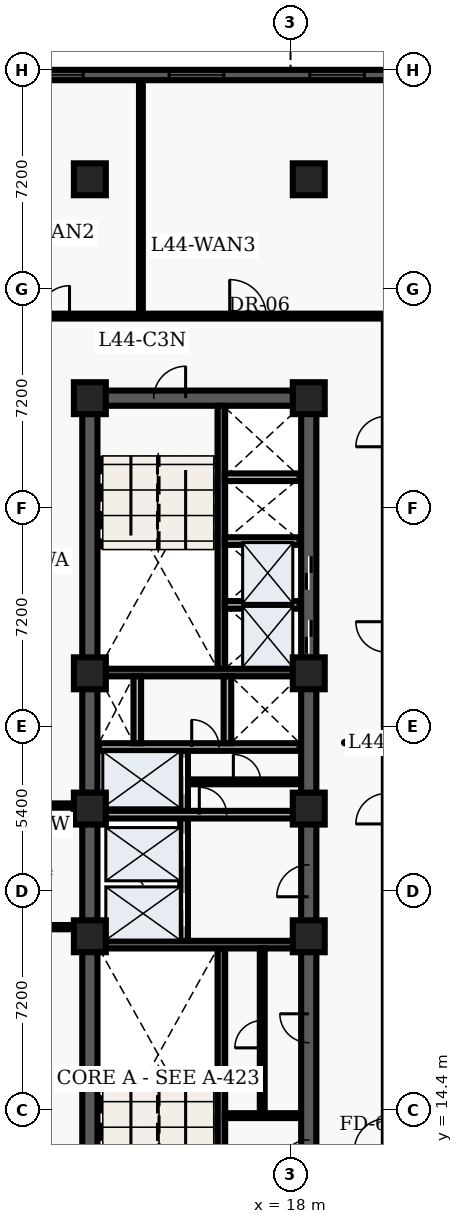
"""IFC4 building model, lengths in metres.
Left out: names, types, materials, properties, quantities, classifications, styles, units other than length and angle.
Written with IfcOpenShell. Run it as: python <this file> out.ifc"""

import sys

from ifc_helpers import new_model, entity, si_unit, converted_unit, direction, frame, origin_with_axes, origin_2d_with_axis, place, context, subcontext, project, spatial, polyline, rectangle, outline, extrude, element, fill, save


model = new_model("IFC4")
c1 = context("Model", 3, precision=1e-05, world=origin_with_axes(), true_north=direction((0.0, 1.0)))
c2 = subcontext(c1, "Body", "Model", "MODEL_VIEW")
j1 = project(units=[si_unit("LENGTHUNIT", "METRE"), converted_unit("PLANEANGLEUNIT", "DEGREE", entity("IfcPlaneAngleMeasure", 0.017), si_unit("PLANEANGLEUNIT", "RADIAN"), dimensions=[0, 0, 0, 0, 0, 0, 0])], contexts=[c1])
p1 = place(None, origin_with_axes())
s1 = spatial("IfcSite", under=j1, at=p1, CompositionType="ELEMENT")
p2 = place(p1, origin_with_axes())
s2 = spatial("IfcBuilding", under=s1, at=p2, CompositionType="ELEMENT")
p3 = place(p2, frame((0.0, 0.0, 179.7), z_axis=(0.0, 0.0, 1.0), x_axis=(1.0, 0.0, 0.0)))
s3 = spatial("IfcBuildingStorey", under=s2, at=p3, CompositionType="ELEMENT", Elevation=179.7)
p4 = place(p3, frame((11.4, 10.8, 0.0), z_axis=(0.0, 0.0, 1.0), x_axis=(0.0, 1.0, 0.0)))
e1 = element("IfcWall", 1, at=p4, inside=s3, PredefinedType="SHEAR", context=c2, shape_type="SweptSolid", body=[
    extrude(outline(polyline([(0.0, -0.25), (27.0, -0.25), (27.0, 0.25), (0.0, 0.25), (0.0, -0.25)])), origin_with_axes(), (0.0, 0.0, 1.0), 3.66),
])
p5 = place(p3, frame((11.4, 37.8, 0.0), z_axis=(0.0, 0.0, 1.0), x_axis=(1.0, 0.0, 0.0)))
e2 = element("IfcWall", 2, at=p5, inside=s3, PredefinedType="SHEAR", context=c2, shape_type="SweptSolid", body=[
    extrude(outline(polyline([(0.0, -0.25), (7.2, -0.25), (7.2, 0.25), (0.0, 0.25), (0.0, -0.25)])), origin_with_axes(), (0.0, 0.0, 1.0), 3.66),
])
p6 = place(p5, frame((2.625, 0.0, 0.0), z_axis=(0.0, 0.0, 1.0), x_axis=(1.0, 0.0, 0.0)))
e3 = element("IfcOpeningElement", 3, at=p6, cuts=e2, PredefinedType="OPENING", context=c2, shape_type="SweptSolid", body=[
    extrude(rectangle(XDim=1.05, YDim=0.52, at=origin_2d_with_axis()), origin_with_axes(), (0.0, 0.0, 1.0), 2.15),
])
p7 = place(p3, frame((18.6, 10.8, 0.0), z_axis=(0.0, 0.0, 1.0), x_axis=(0.0, 1.0, 0.0)))
e4 = element("IfcWall", 4, at=p7, inside=s3, PredefinedType="SHEAR", context=c2, shape_type="SweptSolid", body=[
    extrude(outline(polyline([(0.0, -0.25), (13.5, -0.25), (13.5, 0.25), (0.0, 0.25), (0.0, -0.25)])), origin_with_axes(), (0.0, 0.0, 1.0), 3.66),
])
p8 = place(p7, frame((11.125, 0.0, 0.0), z_axis=(0.0, 0.0, 1.0), x_axis=(1.0, 0.0, 0.0)))
e5 = element("IfcOpeningElement", 5, at=p8, cuts=e4, PredefinedType="OPENING", context=c2, shape_type="SweptSolid", body=[
    extrude(rectangle(XDim=1.05, YDim=0.52, at=origin_2d_with_axis()), origin_with_axes(), (0.0, 0.0, 1.0), 2.15),
])
p9 = place(p7, frame((2.125, 0.0, 0.0), z_axis=(0.0, 0.0, 1.0), x_axis=(1.0, 0.0, 0.0)))
e6 = element("IfcOpeningElement", 6, at=p9, cuts=e4, PredefinedType="OPENING", context=c2, shape_type="SweptSolid", body=[
    extrude(rectangle(XDim=0.95, YDim=0.52, at=origin_2d_with_axis()), origin_with_axes(), (0.0, 0.0, 1.0), 2.15),
])
p10 = place(p7, frame((6.275, 0.0, 0.0), z_axis=(0.0, 0.0, 1.0), x_axis=(1.0, 0.0, 0.0)))
e7 = element("IfcOpeningElement", 7, at=p10, cuts=e4, PredefinedType="OPENING", context=c2, shape_type="SweptSolid", body=[
    extrude(rectangle(XDim=0.95, YDim=0.52, at=origin_2d_with_axis()), origin_with_axes(), (0.0, 0.0, 1.0), 2.15),
])
p11 = place(p3, frame((18.6, 24.3, 0.0), z_axis=(0.0, 0.0, 1.0), x_axis=(0.0, 1.0, 0.0)))
e8 = element("IfcWall", 8, at=p11, inside=s3, PredefinedType="SHEAR", context=c2, shape_type="SweptSolid", body=[
    extrude(outline(polyline([(0.0, -0.25), (13.5, -0.25), (13.5, 0.25), (0.0, 0.25), (0.0, -0.25)])), origin_with_axes(), (0.0, 0.0, 1.0), 3.66),
])
p12 = place(p11, frame((5.65, 0.0, 0.0), z_axis=(0.0, 0.0, 1.0), x_axis=(1.0, 0.0, 0.0)))
e9 = element("IfcOpeningElement", 9, at=p12, cuts=e8, PredefinedType="OPENING", context=c2, shape_type="SweptSolid", body=[
    extrude(rectangle(XDim=1.1, YDim=0.52, at=origin_2d_with_axis()), origin_with_axes(), (0.0, 0.0, 1.0), 2.15),
])
p13 = place(p11, frame((7.75, 0.0, 0.0), z_axis=(0.0, 0.0, 1.0), x_axis=(1.0, 0.0, 0.0)))
e10 = element("IfcOpeningElement", 10, at=p13, cuts=e8, PredefinedType="OPENING", context=c2, shape_type="SweptSolid", body=[
    extrude(rectangle(XDim=1.1, YDim=0.52, at=origin_2d_with_axis()), origin_with_axes(), (0.0, 0.0, 1.0), 2.15),
])
p14 = place(p3, frame((15.725, 11.05, 0.0), z_axis=(0.0, 0.0, 1.0), x_axis=(0.0, 1.0, 0.0)))
e11 = element("IfcWall", 11, at=p14, inside=s3, PredefinedType="SHEAR", context=c2, shape_type="SweptSolid", body=[
    extrude(outline(polyline([(0.0, -0.125), (8.65, -0.125), (8.65, 0.125), (0.0, 0.125), (0.0, -0.125)])), origin_with_axes(), (0.0, 0.0, 1.0), 3.66),
])
p15 = place(p3, frame((11.65, 19.825, 0.0), z_axis=(0.0, 0.0, 1.0), x_axis=(1.0, 0.0, 0.0)))
e12 = element("IfcWall", 12, at=p15, inside=s3, PredefinedType="SHEAR", context=c2, shape_type="SweptSolid", body=[
    extrude(outline(polyline([(0.0, -0.125), (6.7, -0.125), (6.7, 0.125), (0.0, 0.125), (0.0, -0.125)])), origin_with_axes(), (0.0, 0.0, 1.0), 3.66),
])
p16 = place(p3, frame((15.725, 28.9, 0.0), z_axis=(0.0, 0.0, 1.0), x_axis=(0.0, 1.0, 0.0)))
e13 = element("IfcWall", 13, at=p16, inside=s3, PredefinedType="SHEAR", context=c2, shape_type="SweptSolid", body=[
    extrude(outline(polyline([(0.0, -0.125), (8.65, -0.125), (8.65, 0.125), (0.0, 0.125), (0.0, -0.125)])), origin_with_axes(), (0.0, 0.0, 1.0), 3.66),
])
p17 = place(p3, frame((11.65, 28.775, 0.0), z_axis=(0.0, 0.0, 1.0), x_axis=(1.0, 0.0, 0.0)))
e14 = element("IfcWall", 14, at=p17, inside=s3, PredefinedType="SHEAR", context=c2, shape_type="SweptSolid", body=[
    extrude(outline(polyline([(0.0, -0.125), (6.7, -0.125), (6.7, 0.125), (0.0, 0.125), (0.0, -0.125)])), origin_with_axes(), (0.0, 0.0, 1.0), 3.66),
])
p18 = place(p3, frame((14.5, 19.95, 0.0), z_axis=(0.0, 0.0, 1.0), x_axis=(0.0, 1.0, 0.0)))
e15 = element("IfcWall", 15, at=p18, inside=s3, PredefinedType="SOLIDWALL", context=c2, shape_type="SweptSolid", body=[
    extrude(outline(polyline([(0.0, -0.125), (6.25, -0.125), (6.25, 0.125), (0.0, 0.125), (0.0, -0.125)])), origin_with_axes(), (0.0, 0.0, 1.0), 2.7),
])
p19 = place(p18, frame((1.025, 0.0, 0.0), z_axis=(0.0, 0.0, 1.0), x_axis=(1.0, 0.0, 0.0)))
e16 = element("IfcOpeningElement", 16, at=p19, cuts=e15, PredefinedType="OPENING", context=c2, shape_type="SweptSolid", body=[
    extrude(rectangle(XDim=1.1, YDim=0.27, at=origin_2d_with_axis()), origin_with_axes(), (0.0, 0.0, 1.0), 2.15),
])
p20 = place(p18, frame((2.975, 0.0, 0.0), z_axis=(0.0, 0.0, 1.0), x_axis=(1.0, 0.0, 0.0)))
e17 = element("IfcOpeningElement", 17, at=p20, cuts=e15, PredefinedType="OPENING", context=c2, shape_type="SweptSolid", body=[
    extrude(rectangle(XDim=1.1, YDim=0.27, at=origin_2d_with_axis()), origin_with_axes(), (0.0, 0.0, 1.0), 2.15),
])
p21 = place(p18, frame((5.425, 0.0, 0.0), z_axis=(0.0, 0.0, 1.0), x_axis=(1.0, 0.0, 0.0)))
e18 = element("IfcOpeningElement", 18, at=p21, cuts=e15, PredefinedType="OPENING", context=c2, shape_type="SweptSolid", body=[
    extrude(rectangle(XDim=1.2, YDim=0.27, at=origin_2d_with_axis()), origin_with_axes(), (0.0, 0.0, 1.0), 2.15),
])
p22 = place(p3, frame((11.7, 24.1, 0.0), z_axis=(0.0, 0.0, 1.0), x_axis=(1.0, 0.0, 0.0)))
e19 = element("IfcWall", 19, at=p22, inside=s3, PredefinedType="SOLIDWALL", context=c2, shape_type="SweptSolid", body=[
    extrude(outline(polyline([(0.0, -0.125), (6.6, -0.125), (6.6, 0.125), (0.0, 0.125), (0.0, -0.125)])), origin_with_axes(), (0.0, 0.0, 1.0), 2.7),
])
p23 = place(p22, frame((3.75, 0.0, 0.0), z_axis=(0.0, 0.0, 1.0), x_axis=(1.0, 0.0, 0.0)))
e20 = element("IfcOpeningElement", 20, at=p23, cuts=e19, PredefinedType="OPENING", context=c2, shape_type="SweptSolid", body=[
    extrude(rectangle(XDim=0.9, YDim=0.27, at=origin_2d_with_axis()), origin_with_axes(), (0.0, 0.0, 1.0), 2.15),
])
p24 = place(p3, frame((11.7, 26.325, 0.0), z_axis=(0.0, 0.0, 1.0), x_axis=(1.0, 0.0, 0.0)))
e21 = element("IfcWall", 21, at=p24, inside=s3, PredefinedType="SOLIDWALL", context=c2, shape_type="SweptSolid", body=[
    extrude(outline(polyline([(0.0, -0.125), (6.6, -0.125), (6.6, 0.125), (0.0, 0.125), (0.0, -0.125)])), origin_with_axes(), (0.0, 0.0, 1.0), 2.7),
])
p25 = place(p24, frame((3.5, 0.0, 0.0), z_axis=(0.0, 0.0, 1.0), x_axis=(1.0, 0.0, 0.0)))
e22 = element("IfcOpeningElement", 22, at=p25, cuts=e21, PredefinedType="OPENING", context=c2, shape_type="SweptSolid", body=[
    extrude(rectangle(XDim=0.9, YDim=0.27, at=origin_2d_with_axis()), origin_with_axes(), (0.0, 0.0, 1.0), 2.15),
])
for number, where, z_axis, x_axis in (
    (23, (12.96, 26.45, 0.0), (0.0, 0.0, 1.0), (0.0, 1.0, 0.0)),
    (24, (15.925, 26.45, 0.0), (0.0, 0.0, 1.0), (0.0, 1.0, 0.0)),
):
    element("IfcWall", number, at=place(p3, frame(where, z_axis=z_axis, x_axis=x_axis)), inside=s3, PredefinedType="SOLIDWALL", context=c2, shape_type="SweptSolid", body=[
        extrude(outline(polyline([(0.0, -0.125), (2.2, -0.125), (2.2, 0.125), (0.0, 0.125), (0.0, -0.125)])), origin_with_axes(), (0.0, 0.0, 1.0), 2.7),
    ])
for number, where, z_axis, x_axis in (
    (25, (11.4, 20.1, 0.0), (0.0, 0.0, 1.0), (1.0, 0.0, 0.0)),
    (26, (11.4, 24.3, 0.0), (0.0, 0.0, 1.0), (1.0, 0.0, 0.0)),
    (27, (11.4, 28.75, 0.0), (0.0, 0.0, 1.0), (1.0, 0.0, 0.0)),
    (28, (11.4, 37.8, 0.0), (0.0, 0.0, 1.0), (1.0, 0.0, 0.0)),
    (29, (11.4, 45.0, 0.0), (0.0, 0.0, 1.0), (1.0, 0.0, 0.0)),
    (30, (18.6, 20.1, 0.0), (0.0, 0.0, 1.0), (1.0, 0.0, 0.0)),
    (31, (18.6, 24.3, 0.0), (0.0, 0.0, 1.0), (1.0, 0.0, 0.0)),
    (32, (18.6, 28.75, 0.0), (0.0, 0.0, 1.0), (1.0, 0.0, 0.0)),
    (33, (18.6, 37.8, 0.0), (0.0, 0.0, 1.0), (1.0, 0.0, 0.0)),
    (34, (18.6, 45.0, 0.0), (0.0, 0.0, 1.0), (1.0, 0.0, 0.0)),
):
    element("IfcColumn", number, at=place(p3, frame(where, z_axis=z_axis, x_axis=x_axis)), inside=s3, PredefinedType="COLUMN", context=c2, shape_type="SweptSolid", body=[
        extrude(rectangle(XDim=1.05, YDim=1.05, at=origin_2d_with_axis()), origin_with_axes(), (0.0, 0.0, 1.0), 3.9),
    ])
p26 = place(p3, frame((14.62, 25.18, 0.0), z_axis=(0.0, 0.0, 1.0), x_axis=(1.0, 0.0, 0.0)))
e35 = element("IfcWall", 35, at=p26, inside=s3, PredefinedType="PARTITIONING", context=c2, shape_type="SweptSolid", body=[
    extrude(outline(polyline([(0.0, -0.08), (3.68, -0.08), (3.68, 0.08), (0.0, 0.08), (0.0, -0.08)])), origin_with_axes(), (0.0, 0.0, 1.0), 2.7),
])
p27 = place(p26, frame((1.95, 0.0, 0.0), z_axis=(0.0, 0.0, 1.0), x_axis=(1.0, 0.0, 0.0)))
e36 = element("IfcOpeningElement", 36, at=p27, cuts=e35, PredefinedType="OPENING", context=c2, shape_type="SweptSolid", body=[
    extrude(rectangle(XDim=0.9, YDim=0.18, at=origin_2d_with_axis()), origin_with_axes(), (0.0, 0.0, 1.0), 2.15),
])
p28 = place(p3, frame((15.84, 14.2, 0.0), z_axis=(0.0, 0.0, 1.0), x_axis=(1.0, 0.0, 0.0)))
e37 = element("IfcWall", 37, at=p28, inside=s3, PredefinedType="PARTITIONING", context=c2, shape_type="SweptSolid", body=[
    extrude(outline(polyline([(0.0, -0.08), (2.46, -0.08), (2.46, 0.08), (0.0, 0.08), (0.0, -0.08)])), origin_with_axes(), (0.0, 0.0, 1.0), 2.7),
])
p29 = place(p3, frame((17.07, 14.28, 0.0), z_axis=(0.0, 0.0, 1.0), x_axis=(0.0, 1.0, 0.0)))
e38 = element("IfcWall", 38, at=p29, inside=s3, PredefinedType="PARTITIONING", context=c2, shape_type="SweptSolid", body=[
    extrude(outline(polyline([(0.0, -0.08), (5.42, -0.08), (5.42, 0.08), (0.0, 0.08), (0.0, -0.08)])), origin_with_axes(), (0.0, 0.0, 1.0), 2.7),
])
p30 = place(p29, frame((2.6, 0.0, 0.0), z_axis=(0.0, 0.0, 1.0), x_axis=(1.0, 0.0, 0.0)))
e39 = element("IfcOpeningElement", 39, at=p30, cuts=e38, PredefinedType="OPENING", context=c2, shape_type="SweptSolid", body=[
    extrude(rectangle(XDim=0.9, YDim=0.18, at=origin_2d_with_axis()), origin_with_axes(), (0.0, 0.0, 1.0), 2.15),
])
for number, where, z_axis, x_axis in (
    (40, (15.84, 31.0, 0.0), (0.0, 0.0, 1.0), (1.0, 0.0, 0.0)),
    (41, (15.84, 33.1, 0.0), (0.0, 0.0, 1.0), (1.0, 0.0, 0.0)),
    (42, (15.84, 35.2, 0.0), (0.0, 0.0, 1.0), (1.0, 0.0, 0.0)),
):
    element("IfcWall", number, at=place(p3, frame(where, z_axis=z_axis, x_axis=x_axis)), inside=s3, PredefinedType="SOLIDWALL", context=c2, shape_type="SweptSolid", body=[
        extrude(outline(polyline([(0.0, -0.125), (2.46, -0.125), (2.46, 0.125), (0.0, 0.125), (0.0, -0.125)])), origin_with_axes(), (0.0, 0.0, 1.0), 2.7),
    ])
for number, where, z_axis, x_axis in (
    (43, (9.52, 20.4, 0.0), (0.0, 0.0, 1.0), (1.0, 0.0, 0.0)),
    (44, (9.52, 24.4, 0.0), (0.0, 0.0, 1.0), (1.0, 0.0, 0.0)),
):
    element("IfcWall", number, at=place(p3, frame(where, z_axis=z_axis, x_axis=x_axis)), inside=s3, PredefinedType="PARTITIONING", context=c2, shape_type="SweptSolid", body=[
        extrude(outline(polyline([(0.0, -0.07), (1.58, -0.07), (1.58, 0.07), (0.0, 0.07), (0.0, -0.07)])), origin_with_axes(), (0.0, 0.0, 1.0), 2.7),
    ])
p31 = place(p3, frame((2.6, 40.5, 0.0), z_axis=(0.0, 0.0, 1.0), x_axis=(1.0, 0.0, 0.0)))
e45 = element("IfcWall", 45, at=p31, inside=s3, PredefinedType="PARTITIONING", context=c2, shape_type="SweptSolid", body=[
    extrude(outline(polyline([(0.0, -0.08), (22.87, -0.08), (22.87, 0.08), (0.0, 0.08), (0.0, -0.08)])), origin_with_axes(), (0.0, 0.0, 1.0), 2.7),
])
p32 = place(p31, frame((2.386, 0.0, 0.0), z_axis=(0.0, 0.0, 1.0), x_axis=(1.0, 0.0, 0.0)))
e46 = element("IfcOpeningElement", 46, at=p32, cuts=e45, PredefinedType="OPENING", context=c2, shape_type="SweptSolid", body=[
    extrude(rectangle(XDim=1.0, YDim=0.18, at=origin_2d_with_axis()), origin_with_axes(), (0.0, 0.0, 1.0), 2.15),
])
p33 = place(p31, frame((7.631, 0.0, 0.0), z_axis=(0.0, 0.0, 1.0), x_axis=(1.0, 0.0, 0.0)))
e47 = element("IfcOpeningElement", 47, at=p33, cuts=e45, PredefinedType="OPENING", context=c2, shape_type="SweptSolid", body=[
    extrude(rectangle(XDim=1.0, YDim=0.18, at=origin_2d_with_axis()), origin_with_axes(), (0.0, 0.0, 1.0), 2.15),
])
p34 = place(p31, frame((13.999, 0.0, 0.0), z_axis=(0.0, 0.0, 1.0), x_axis=(1.0, 0.0, 0.0)))
e48 = element("IfcOpeningElement", 48, at=p34, cuts=e45, PredefinedType="OPENING", context=c2, shape_type="SweptSolid", body=[
    extrude(rectangle(XDim=1.2, YDim=0.18, at=origin_2d_with_axis()), origin_with_axes(), (0.0, 0.0, 1.0), 2.2),
])
p35 = place(p3, frame((13.079, 40.6, 0.0), z_axis=(0.0, 0.0, 1.0), x_axis=(0.0, 1.0, 0.0)))
e49 = element("IfcWall", 49, at=p35, inside=s3, PredefinedType="PARTITIONING", context=c2, shape_type="SweptSolid", body=[
    extrude(outline(polyline([(0.0, -0.062), (7.665, -0.062), (7.665, 0.062), (0.0, 0.062), (0.0, -0.062)])), origin_with_axes(), (0.0, 0.0, 1.0), 2.7),
])
p36 = place(p3, frame((2.74, 48.43, 0.0), z_axis=(0.0, 0.0, 1.0), x_axis=(1.0, 0.0, 0.0)))
e50 = element("IfcWall", 50, at=p36, inside=s3, PredefinedType="SOLIDWALL", context=c2, shape_type="SweptSolid", body=[
    extrude(outline(polyline([(0.0, -0.17), (19.705, -0.17), (19.705, 0.17), (0.0, 0.17), (0.0, -0.17)])), origin_with_axes(), (0.0, 0.0, 1.0), 3.66),
])
p37 = place(p36, frame((2.913, 0.0, 0.45), z_axis=(0.0, 0.0, 1.0), x_axis=(1.0, 0.0, 0.0)))
e51 = element("IfcOpeningElement", 51, at=p37, cuts=e50, PredefinedType="OPENING", context=c2, shape_type="SweptSolid", body=[
    extrude(rectangle(XDim=1.8, YDim=0.36, at=origin_2d_with_axis()), origin_with_axes(), (0.0, 0.0, 1.0), 2.1),
])
p38 = place(p36, frame((7.539, 0.0, 0.45), z_axis=(0.0, 0.0, 1.0), x_axis=(1.0, 0.0, 0.0)))
e52 = element("IfcOpeningElement", 52, at=p38, cuts=e50, PredefinedType="OPENING", context=c2, shape_type="SweptSolid", body=[
    extrude(rectangle(XDim=1.8, YDim=0.36, at=origin_2d_with_axis()), origin_with_axes(), (0.0, 0.0, 1.0), 2.1),
])
p39 = place(p36, frame((12.166, 0.0, 0.45), z_axis=(0.0, 0.0, 1.0), x_axis=(1.0, 0.0, 0.0)))
e53 = element("IfcOpeningElement", 53, at=p39, cuts=e50, PredefinedType="OPENING", context=c2, shape_type="SweptSolid", body=[
    extrude(rectangle(XDim=1.8, YDim=0.36, at=origin_2d_with_axis()), origin_with_axes(), (0.0, 0.0, 1.0), 2.1),
])
p40 = place(p36, frame((16.792, 0.0, 0.45), z_axis=(0.0, 0.0, 1.0), x_axis=(1.0, 0.0, 0.0)))
e54 = element("IfcOpeningElement", 54, at=p40, cuts=e50, PredefinedType="OPENING", context=c2, shape_type="SweptSolid", body=[
    extrude(rectangle(XDim=1.8, YDim=0.36, at=origin_2d_with_axis()), origin_with_axes(), (0.0, 0.0, 1.0), 2.1),
])
p41 = place(p11, frame((5.65, 0.0, 0.0), z_axis=(0.0, 0.0, 1.0), x_axis=(1.0, 0.0, 0.0)))
e55 = element("IfcDoor", 55, at=p41, inside=s3, OperationType="SLIDING_TO_LEFT", PredefinedType="DOOR", context=c2, shape_type="SweptSolid", body=[
    extrude(rectangle(XDim=1.1, YDim=0.09, at=origin_2d_with_axis()), origin_with_axes(), (0.0, 0.0, 1.0), 2.15),
])
fill(e9, e55)
p42 = place(p11, frame((7.75, 0.0, 0.0), z_axis=(0.0, 0.0, 1.0), x_axis=(1.0, 0.0, 0.0)))
e56 = element("IfcDoor", 56, at=p42, inside=s3, OperationType="SLIDING_TO_RIGHT", PredefinedType="DOOR", context=c2, shape_type="SweptSolid", body=[
    extrude(rectangle(XDim=1.1, YDim=0.09, at=origin_2d_with_axis()), origin_with_axes(), (0.0, 0.0, 1.0), 2.15),
])
fill(e10, e56)
p43 = place(p18, frame((1.025, 0.0, 0.0), z_axis=(0.0, 0.0, 1.0), x_axis=(1.0, 0.0, 0.0)))
e57 = element("IfcDoor", 57, at=p43, inside=s3, OperationType="SLIDING_TO_LEFT", PredefinedType="DOOR", context=c2, shape_type="SweptSolid", body=[
    extrude(rectangle(XDim=1.1, YDim=0.09, at=origin_2d_with_axis()), origin_with_axes(), (0.0, 0.0, 1.0), 2.15),
])
fill(e16, e57)
p44 = place(p18, frame((2.975, 0.0, 0.0), z_axis=(0.0, 0.0, 1.0), x_axis=(1.0, 0.0, 0.0)))
e58 = element("IfcDoor", 58, at=p44, inside=s3, OperationType="SLIDING_TO_RIGHT", PredefinedType="DOOR", context=c2, shape_type="SweptSolid", body=[
    extrude(rectangle(XDim=1.1, YDim=0.09, at=origin_2d_with_axis()), origin_with_axes(), (0.0, 0.0, 1.0), 2.15),
])
fill(e17, e58)
p45 = place(p18, frame((5.425, 0.0, 0.0), z_axis=(0.0, 0.0, 1.0), x_axis=(1.0, 0.0, 0.0)))
e59 = element("IfcDoor", 59, at=p45, inside=s3, OperationType="DOUBLE_DOOR_SLIDING", PredefinedType="DOOR", context=c2, shape_type="SweptSolid", body=[
    extrude(rectangle(XDim=1.2, YDim=0.09, at=origin_2d_with_axis()), origin_with_axes(), (0.0, 0.0, 1.0), 2.15),
])
fill(e18, e59)
p46 = place(p5, frame((2.625, 0.0, 0.0), z_axis=(0.0, 0.0, 1.0), x_axis=(1.0, 0.0, 0.0)))
e60 = element("IfcDoor", 60, at=p46, inside=s3, OperationType="SINGLE_SWING_RIGHT", PredefinedType="DOOR", context=c2, shape_type="SweptSolid", body=[
    extrude(rectangle(XDim=1.05, YDim=0.09, at=origin_2d_with_axis()), origin_with_axes(), (0.0, 0.0, 1.0), 2.15),
])
fill(e3, e60)
p47 = place(p7, frame((11.125, 0.0, 0.0), z_axis=(0.0, 0.0, 1.0), x_axis=(1.0, 0.0, 0.0)))
e61 = element("IfcDoor", 61, at=p47, inside=s3, OperationType="SINGLE_SWING_LEFT", PredefinedType="DOOR", context=c2, shape_type="SweptSolid", body=[
    extrude(rectangle(XDim=1.05, YDim=0.09, at=origin_2d_with_axis()), origin_with_axes(), (0.0, 0.0, 1.0), 2.15),
])
fill(e5, e61)
p48 = place(p24, frame((3.5, 0.0, 0.0), z_axis=(0.0, 0.0, 1.0), x_axis=(1.0, 0.0, 0.0)))
e62 = element("IfcDoor", 62, at=p48, inside=s3, OperationType="SINGLE_SWING_LEFT", PredefinedType="DOOR", context=c2, shape_type="SweptSolid", body=[
    extrude(rectangle(XDim=0.9, YDim=0.09, at=origin_2d_with_axis()), origin_with_axes(), (0.0, 0.0, 1.0), 2.15),
])
fill(e22, e62)
p49 = place(p22, frame((3.75, 0.0, 0.0), z_axis=(0.0, 0.0, 1.0), x_axis=(1.0, 0.0, 0.0)))
e63 = element("IfcDoor", 63, at=p49, inside=s3, OperationType="SINGLE_SWING_LEFT", PredefinedType="DOOR", context=c2, shape_type="SweptSolid", body=[
    extrude(rectangle(XDim=0.9, YDim=0.09, at=origin_2d_with_axis()), origin_with_axes(), (0.0, 0.0, 1.0), 2.15),
])
fill(e20, e63)
p50 = place(p26, frame((1.95, 0.0, 0.0), z_axis=(0.0, 0.0, 1.0), x_axis=(1.0, 0.0, 0.0)))
e64 = element("IfcDoor", 64, at=p50, inside=s3, OperationType="SINGLE_SWING_LEFT", PredefinedType="DOOR", context=c2, shape_type="SweptSolid", body=[
    extrude(rectangle(XDim=0.9, YDim=0.09, at=origin_2d_with_axis()), origin_with_axes(), (0.0, 0.0, 1.0), 2.15),
])
fill(e36, e64)
p51 = place(p7, frame((2.125, 0.0, 0.0), z_axis=(0.0, 0.0, 1.0), x_axis=(1.0, 0.0, 0.0)))
e65 = element("IfcDoor", 65, at=p51, inside=s3, OperationType="SINGLE_SWING_LEFT", PredefinedType="DOOR", context=c2, shape_type="SweptSolid", body=[
    extrude(rectangle(XDim=0.95, YDim=0.09, at=origin_2d_with_axis()), origin_with_axes(), (0.0, 0.0, 1.0), 2.15),
])
fill(e6, e65)
p52 = place(p29, frame((2.6, 0.0, 0.0), z_axis=(0.0, 0.0, 1.0), x_axis=(1.0, 0.0, 0.0)))
e66 = element("IfcDoor", 66, at=p52, inside=s3, OperationType="SINGLE_SWING_LEFT", PredefinedType="DOOR", context=c2, shape_type="SweptSolid", body=[
    extrude(rectangle(XDim=0.9, YDim=0.09, at=origin_2d_with_axis()), origin_with_axes(), (0.0, 0.0, 1.0), 2.15),
])
fill(e39, e66)
p53 = place(p7, frame((6.275, 0.0, 0.0), z_axis=(0.0, 0.0, 1.0), x_axis=(1.0, 0.0, 0.0)))
e67 = element("IfcDoor", 67, at=p53, inside=s3, OperationType="SINGLE_SWING_RIGHT", PredefinedType="DOOR", context=c2, shape_type="SweptSolid", body=[
    extrude(rectangle(XDim=0.95, YDim=0.09, at=origin_2d_with_axis()), origin_with_axes(), (0.0, 0.0, 1.0), 2.15),
])
fill(e7, e67)
p54 = place(p31, frame((7.631, 0.0, 0.0), z_axis=(0.0, 0.0, 1.0), x_axis=(1.0, 0.0, 0.0)))
e68 = element("IfcDoor", 68, at=p54, inside=s3, OperationType="SINGLE_SWING_RIGHT", PredefinedType="DOOR", context=c2, shape_type="SweptSolid", body=[
    extrude(rectangle(XDim=1.0, YDim=0.09, at=origin_2d_with_axis()), origin_with_axes(), (0.0, 0.0, 1.0), 2.15),
])
fill(e47, e68)
p55 = place(p31, frame((13.999, 0.0, 0.0), z_axis=(0.0, 0.0, 1.0), x_axis=(1.0, 0.0, 0.0)))
e69 = element("IfcDoor", 69, at=p55, inside=s3, OperationType="SINGLE_SWING_LEFT", PredefinedType="DOOR", context=c2, shape_type="SweptSolid", body=[
    extrude(rectangle(XDim=1.2, YDim=0.09, at=origin_2d_with_axis()), origin_with_axes(), (0.0, 0.0, 1.0), 2.2),
])
fill(e48, e69)
p56 = place(p36, frame((7.539, 0.0, 0.45), z_axis=(0.0, 0.0, 1.0), x_axis=(1.0, 0.0, 0.0)))
e70 = element("IfcWindow", 70, at=p56, inside=s3, PredefinedType="WINDOW", context=c2, shape_type="SweptSolid", body=[
    extrude(rectangle(XDim=1.8, YDim=0.09, at=origin_2d_with_axis()), origin_with_axes(), (0.0, 0.0, 1.0), 2.1),
])
fill(e52, e70)
p57 = place(p36, frame((12.166, 0.0, 0.45), z_axis=(0.0, 0.0, 1.0), x_axis=(1.0, 0.0, 0.0)))
e71 = element("IfcWindow", 71, at=p57, inside=s3, PredefinedType="WINDOW", context=c2, shape_type="SweptSolid", body=[
    extrude(rectangle(XDim=1.8, YDim=0.09, at=origin_2d_with_axis()), origin_with_axes(), (0.0, 0.0, 1.0), 2.1),
])
fill(e53, e71)
p58 = place(p36, frame((16.792, 0.0, 0.45), z_axis=(0.0, 0.0, 1.0), x_axis=(1.0, 0.0, 0.0)))
e72 = element("IfcWindow", 72, at=p58, inside=s3, PredefinedType="WINDOW", context=c2, shape_type="SweptSolid", body=[
    extrude(rectangle(XDim=1.8, YDim=0.09, at=origin_2d_with_axis()), origin_with_axes(), (0.0, 0.0, 1.0), 2.1),
])
fill(e54, e72)
save(model, sys.argv[1])
